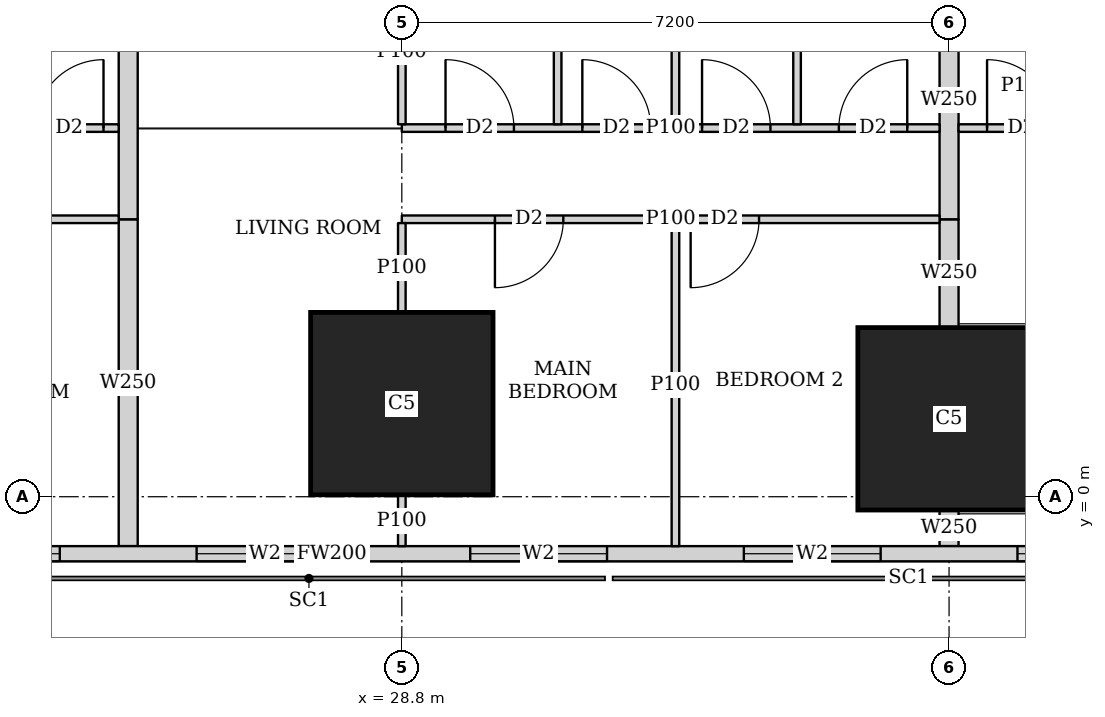
"""IFC4 building model, lengths in metres.
Left out: names, types, materials, properties, quantities, classifications, styles, units other than length and angle.
Written with IfcOpenShell. Run it as: python <this file> out.ifc"""

import sys

from ifc_helpers import new_model, si_unit, direction, frame, frame_2d, origin, origin_2d, place, context, subcontext, project, spatial, rectangle, extrude, element, fill, save


model = new_model("IFC4")
c1 = context("Model", 3, precision=1e-05, world=origin(), true_north=direction((0.0, 1.0)))
c2 = subcontext(c1, "Body", "Model", "MODEL_VIEW")
j1 = project(units=[si_unit("LENGTHUNIT", "METRE"), si_unit("PLANEANGLEUNIT", "RADIAN")], contexts=[c1])
p1 = place(None, origin())
s1 = spatial("IfcSite", under=j1, at=p1, CompositionType="ELEMENT")
p2 = place(p1, origin())
s2 = spatial("IfcBuilding", under=s1, at=p2, CompositionType="ELEMENT")
p3 = place(p2, frame((0.0, 0.0, 208.7)))
s3 = spatial("IfcBuildingStorey", under=s2, at=p3, CompositionType="ELEMENT", Elevation=208.7)
for number, where, z_axis, x_axis in (
    (1, (28.8, 1.225, 0.0), (0.0, 0.0, 1.0), (1.0, 0.0, 0.0)),
    (2, (36.0, 1.025, 0.0), (0.0, 0.0, 1.0), (1.0, 0.0, 0.0)),
):
    element("IfcColumn", number, at=place(p3, frame(where, z_axis=z_axis, x_axis=x_axis)), inside=s3, PredefinedType="COLUMN", context=c2, shape_type="SweptSolid", body=[
        extrude(rectangle(XDim=2.4, YDim=2.4, at=origin_2d()), origin(), (0.0, 0.0, 1.0), 3.75),
    ])
p4 = place(p3, frame((7.363, -0.75, 0.0), z_axis=(0.0, 0.0, 1.0), x_axis=(1.0, 0.0, 0.0)))
e3 = element("IfcWall", 3, at=p4, inside=s3, PredefinedType="SOLIDWALL", context=c2, shape_type="SweptSolid", body=[
    extrude(rectangle(XDim=40.428, YDim=0.2, at=frame_2d((20.214, 0.0))), origin(), (0.0, 0.0, 1.0), 3.5),
])
p5 = place(p4, frame((2.319, 0.0, 0.9)))
e4 = element("IfcOpeningElement", 4, at=p5, cuts=e3, PredefinedType="OPENING", context=c2, shape_type="SweptSolid", body=[
    extrude(rectangle(XDim=2.4, YDim=1.5, at=frame_2d((1.2, 0.75))), frame((0.0, 0.11, 0.0), z_axis=(0.0, -1.0, 0.0), x_axis=(1.0, 0.0, 0.0)), (0.0, 0.0, 1.0), 0.22),
])
p6 = place(p4, frame((7.937, 0.0, 0.9)))
e5 = element("IfcOpeningElement", 5, at=p6, cuts=e3, PredefinedType="OPENING", context=c2, shape_type="SweptSolid", body=[
    extrude(rectangle(XDim=1.8, YDim=1.5, at=frame_2d((0.9, 0.75))), frame((0.0, 0.11, 0.0), z_axis=(0.0, -1.0, 0.0), x_axis=(1.0, 0.0, 0.0)), (0.0, 0.0, 1.0), 0.22),
])
p7 = place(p4, frame((11.537, 0.0, 0.9)))
e6 = element("IfcOpeningElement", 6, at=p7, cuts=e3, PredefinedType="OPENING", context=c2, shape_type="SweptSolid", body=[
    extrude(rectangle(XDim=1.8, YDim=1.5, at=frame_2d((0.9, 0.75))), frame((0.0, 0.11, 0.0), z_axis=(0.0, -1.0, 0.0), x_axis=(1.0, 0.0, 0.0)), (0.0, 0.0, 1.0), 0.22),
])
p8 = place(p4, frame((15.137, 0.0, 0.9)))
e7 = element("IfcOpeningElement", 7, at=p8, cuts=e3, PredefinedType="OPENING", context=c2, shape_type="SweptSolid", body=[
    extrude(rectangle(XDim=1.8, YDim=1.5, at=frame_2d((0.9, 0.75))), frame((0.0, 0.11, 0.0), z_axis=(0.0, -1.0, 0.0), x_axis=(1.0, 0.0, 0.0)), (0.0, 0.0, 1.0), 0.22),
])
p9 = place(p4, frame((18.737, 0.0, 0.9)))
e8 = element("IfcOpeningElement", 8, at=p9, cuts=e3, PredefinedType="OPENING", context=c2, shape_type="SweptSolid", body=[
    extrude(rectangle(XDim=1.8, YDim=1.5, at=frame_2d((0.9, 0.75))), frame((0.0, 0.11, 0.0), z_axis=(0.0, -1.0, 0.0), x_axis=(1.0, 0.0, 0.0)), (0.0, 0.0, 1.0), 0.22),
])
p10 = place(p4, frame((22.337, 0.0, 0.9)))
e9 = element("IfcOpeningElement", 9, at=p10, cuts=e3, PredefinedType="OPENING", context=c2, shape_type="SweptSolid", body=[
    extrude(rectangle(XDim=1.8, YDim=1.5, at=frame_2d((0.9, 0.75))), frame((0.0, 0.11, 0.0), z_axis=(0.0, -1.0, 0.0), x_axis=(1.0, 0.0, 0.0)), (0.0, 0.0, 1.0), 0.22),
])
p11 = place(p4, frame((25.937, 0.0, 0.9)))
e10 = element("IfcOpeningElement", 10, at=p11, cuts=e3, PredefinedType="OPENING", context=c2, shape_type="SweptSolid", body=[
    extrude(rectangle(XDim=1.8, YDim=1.5, at=frame_2d((0.9, 0.75))), frame((0.0, 0.11, 0.0), z_axis=(0.0, -1.0, 0.0), x_axis=(1.0, 0.0, 0.0)), (0.0, 0.0, 1.0), 0.22),
])
p12 = place(p4, frame((29.537, 0.0, 0.9)))
e11 = element("IfcOpeningElement", 11, at=p12, cuts=e3, PredefinedType="OPENING", context=c2, shape_type="SweptSolid", body=[
    extrude(rectangle(XDim=1.8, YDim=1.5, at=frame_2d((0.9, 0.75))), frame((0.0, 0.11, 0.0), z_axis=(0.0, -1.0, 0.0), x_axis=(1.0, 0.0, 0.0)), (0.0, 0.0, 1.0), 0.22),
])
p13 = place(p3, frame((33.68, 42.723, 0.0), z_axis=(0.0, 0.0, 1.0), x_axis=(0.185601160014, -0.982625162207, 0.0)))
e12 = element("IfcWall", 12, at=p13, inside=s3, PredefinedType="SOLIDWALL", context=c2, shape_type="SweptSolid", body=[
    extrude(rectangle(XDim=41.051, YDim=0.15, at=frame_2d((20.526, 0.0))), origin(), (0.0, 0.0, 1.0), 2.5),
])
p14 = place(p13, frame((12.307, 0.0, 0.0)))
e13 = element("IfcOpeningElement", 13, at=p14, cuts=e12, PredefinedType="OPENING", context=c2, shape_type="SweptSolid", body=[
    extrude(rectangle(XDim=1.0, YDim=2.1, at=frame_2d((0.5, 1.05))), frame((0.0, 0.085, 0.0), z_axis=(0.0, -1.0, 0.0), x_axis=(1.0, 0.0, 0.0)), (0.0, 0.0, 1.0), 0.17),
])
p15 = place(p13, frame((16.123, 0.0, 0.0)))
e14 = element("IfcOpeningElement", 14, at=p15, cuts=e12, PredefinedType="OPENING", context=c2, shape_type="SweptSolid", body=[
    extrude(rectangle(XDim=1.0, YDim=2.1, at=frame_2d((0.5, 1.05))), frame((0.0, 0.085, 0.0), z_axis=(0.0, -1.0, 0.0), x_axis=(1.0, 0.0, 0.0)), (0.0, 0.0, 1.0), 0.17),
])
p16 = place(p13, frame((30.902, 0.0, 0.0)))
e15 = element("IfcOpeningElement", 15, at=p16, cuts=e12, PredefinedType="OPENING", context=c2, shape_type="SweptSolid", body=[
    extrude(rectangle(XDim=1.0, YDim=2.1, at=frame_2d((0.5, 1.05))), frame((0.0, 0.085, 0.0), z_axis=(0.0, -1.0, 0.0), x_axis=(1.0, 0.0, 0.0)), (0.0, 0.0, 1.0), 0.17),
])
p17 = place(p3, frame((25.075, 3.65, 0.0), z_axis=(0.0, 0.0, 1.0), x_axis=(-1.0, 0.0, 0.0)))
e16 = element("IfcWall", 16, at=p17, inside=s3, PredefinedType="PARTITIONING", context=c2, shape_type="SweptSolid", body=[
    extrude(rectangle(XDim=3.475, YDim=0.1, at=frame_2d((1.737, 0.0))), origin(), (0.0, 0.0, 1.0), 3.5),
])
p18 = place(p17, frame((2.375, 0.0, 0.0)))
e17 = element("IfcOpeningElement", 17, at=p18, cuts=e16, PredefinedType="OPENING", context=c2, shape_type="SweptSolid", body=[
    extrude(rectangle(XDim=0.9, YDim=2.1, at=frame_2d((0.45, 1.05))), frame((0.0, 0.06, 0.0), z_axis=(0.0, -1.0, 0.0), x_axis=(1.0, 0.0, 0.0)), (0.0, 0.0, 1.0), 0.12),
])
p19 = place(p3, frame((25.075, 4.85, 0.0), z_axis=(0.0, 0.0, 1.0), x_axis=(-1.0, 0.0, 0.0)))
e18 = element("IfcWall", 18, at=p19, inside=s3, PredefinedType="PARTITIONING", context=c2, shape_type="SweptSolid", body=[
    extrude(rectangle(XDim=3.475, YDim=0.1, at=frame_2d((1.737, 0.0))), origin(), (0.0, 0.0, 1.0), 3.5),
])
p20 = place(p19, frame((2.0, 0.0, 0.0)))
e19 = element("IfcOpeningElement", 19, at=p20, cuts=e18, PredefinedType="OPENING", context=c2, shape_type="SweptSolid", body=[
    extrude(rectangle(XDim=0.9, YDim=2.1, at=frame_2d((0.45, 1.05))), frame((0.0, 0.06, 0.0), z_axis=(0.0, -1.0, 0.0), x_axis=(1.0, 0.0, 0.0)), (0.0, 0.0, 1.0), 0.12),
])
p21 = place(p19, frame((0.2, 0.0, 0.0)))
e20 = element("IfcOpeningElement", 20, at=p21, cuts=e18, PredefinedType="OPENING", context=c2, shape_type="SweptSolid", body=[
    extrude(rectangle(XDim=0.9, YDim=2.1, at=frame_2d((0.45, 1.05))), frame((0.0, 0.06, 0.0), z_axis=(0.0, -1.0, 0.0), x_axis=(1.0, 0.0, 0.0)), (0.0, 0.0, 1.0), 0.12),
])
p22 = place(p3, frame((35.875, 3.65, 0.0), z_axis=(0.0, 0.0, 1.0), x_axis=(-1.0, 0.0, 0.0)))
e21 = element("IfcWall", 21, at=p22, inside=s3, PredefinedType="PARTITIONING", context=c2, shape_type="SweptSolid", body=[
    extrude(rectangle(XDim=7.075, YDim=0.1, at=frame_2d((3.538, 0.0))), origin(), (0.0, 0.0, 1.0), 3.5),
])
p23 = place(p22, frame((4.95, 0.0, 0.0)))
e22 = element("IfcOpeningElement", 22, at=p23, cuts=e21, PredefinedType="OPENING", context=c2, shape_type="SweptSolid", body=[
    extrude(rectangle(XDim=0.9, YDim=2.1, at=frame_2d((0.45, 1.05))), frame((0.0, 0.06, 0.0), z_axis=(0.0, -1.0, 0.0), x_axis=(1.0, 0.0, 0.0)), (0.0, 0.0, 1.0), 0.12),
])
p24 = place(p22, frame((2.375, 0.0, 0.0)))
e23 = element("IfcOpeningElement", 23, at=p24, cuts=e21, PredefinedType="OPENING", context=c2, shape_type="SweptSolid", body=[
    extrude(rectangle(XDim=0.9, YDim=2.1, at=frame_2d((0.45, 1.05))), frame((0.0, 0.06, 0.0), z_axis=(0.0, -1.0, 0.0), x_axis=(1.0, 0.0, 0.0)), (0.0, 0.0, 1.0), 0.12),
])
p25 = place(p3, frame((35.875, 4.85, 0.0), z_axis=(0.0, 0.0, 1.0), x_axis=(-1.0, 0.0, 0.0)))
e24 = element("IfcWall", 24, at=p25, inside=s3, PredefinedType="PARTITIONING", context=c2, shape_type="SweptSolid", body=[
    extrude(rectangle(XDim=7.075, YDim=0.1, at=frame_2d((3.538, 0.0))), origin(), (0.0, 0.0, 1.0), 3.5),
])
p26 = place(p25, frame((5.6, 0.0, 0.0)))
e25 = element("IfcOpeningElement", 25, at=p26, cuts=e24, PredefinedType="OPENING", context=c2, shape_type="SweptSolid", body=[
    extrude(rectangle(XDim=0.9, YDim=2.1, at=frame_2d((0.45, 1.05))), frame((0.0, 0.06, 0.0), z_axis=(0.0, -1.0, 0.0), x_axis=(1.0, 0.0, 0.0)), (0.0, 0.0, 1.0), 0.12),
])
p27 = place(p25, frame((2.225, 0.0, 0.0)))
e26 = element("IfcOpeningElement", 26, at=p27, cuts=e24, PredefinedType="OPENING", context=c2, shape_type="SweptSolid", body=[
    extrude(rectangle(XDim=0.9, YDim=2.1, at=frame_2d((0.45, 1.05))), frame((0.0, 0.06, 0.0), z_axis=(0.0, -1.0, 0.0), x_axis=(1.0, 0.0, 0.0)), (0.0, 0.0, 1.0), 0.12),
])
p28 = place(p25, frame((3.8, 0.0, 0.0)))
e27 = element("IfcOpeningElement", 27, at=p28, cuts=e24, PredefinedType="OPENING", context=c2, shape_type="SweptSolid", body=[
    extrude(rectangle(XDim=0.9, YDim=2.1, at=frame_2d((0.45, 1.05))), frame((0.0, 0.06, 0.0), z_axis=(0.0, -1.0, 0.0), x_axis=(1.0, 0.0, 0.0)), (0.0, 0.0, 1.0), 0.12),
])
p29 = place(p25, frame((0.425, 0.0, 0.0)))
e28 = element("IfcOpeningElement", 28, at=p29, cuts=e24, PredefinedType="OPENING", context=c2, shape_type="SweptSolid", body=[
    extrude(rectangle(XDim=0.9, YDim=2.1, at=frame_2d((0.45, 1.05))), frame((0.0, 0.06, 0.0), z_axis=(0.0, -1.0, 0.0), x_axis=(1.0, 0.0, 0.0)), (0.0, 0.0, 1.0), 0.12),
])
p30 = place(p3, frame((28.8, -0.65, 0.0), z_axis=(0.0, 0.0, 1.0), x_axis=(0.0, 1.0, 0.0)))
e29 = element("IfcWall", 29, at=p30, inside=s3, PredefinedType="PARTITIONING", context=c2, shape_type="SweptSolid", body=[
    extrude(rectangle(XDim=0.674, YDim=0.1, at=frame_2d((0.337, 0.0))), origin(), (0.0, 0.0, 1.0), 3.5),
])
p31 = place(p3, frame((28.8, 2.426, 0.0), z_axis=(0.0, 0.0, 1.0), x_axis=(0.0, 1.0, 0.0)))
e30 = element("IfcWall", 30, at=p31, inside=s3, PredefinedType="PARTITIONING", context=c2, shape_type="SweptSolid", body=[
    extrude(rectangle(XDim=1.174, YDim=0.1, at=frame_2d((0.587, 0.0))), origin(), (0.0, 0.0, 1.0), 3.5),
])
p32 = place(p3, frame((32.4, -0.65, 0.0), z_axis=(0.0, 0.0, 1.0), x_axis=(0.0, 1.0, 0.0)))
e31 = element("IfcWall", 31, at=p32, inside=s3, PredefinedType="PARTITIONING", context=c2, shape_type="SweptSolid", body=[
    extrude(rectangle(XDim=4.25, YDim=0.1, at=frame_2d((2.125, 0.0))), origin(), (0.0, 0.0, 1.0), 2.05),
])
p33 = place(p3, frame((28.8, 4.9, 0.0), z_axis=(0.0, 0.0, 1.0), x_axis=(0.0, 1.0, 0.0)))
e32 = element("IfcWall", 32, at=p33, inside=s3, PredefinedType="PARTITIONING", context=c2, shape_type="SweptSolid", body=[
    extrude(rectangle(XDim=1.899, YDim=0.1, at=frame_2d((0.95, 0.0))), origin(), (0.0, 0.0, 1.0), 3.5),
])
for number, where, z_axis, x_axis in (
    (33, (32.4, 4.9, 0.0), (0.0, 0.0, 1.0), (0.0, 1.0, 0.0)),
    (34, (30.85, 4.9, 0.0), (0.0, 0.0, 1.0), (0.0, 1.0, 0.0)),
    (35, (34.0, 4.9, 0.0), (0.0, 0.0, 1.0), (0.0, 1.0, 0.0)),
):
    element("IfcWall", number, at=place(p3, frame(where, z_axis=z_axis, x_axis=x_axis)), inside=s3, PredefinedType="PARTITIONING", context=c2, shape_type="SweptSolid", body=[
        extrude(rectangle(XDim=3.525, YDim=0.1, at=frame_2d((1.763, 0.0))), origin(), (0.0, 0.0, 1.0), 3.5),
    ])
p34 = place(p3, frame((25.2, -0.65, 0.0), z_axis=(0.0, 0.0, 1.0), x_axis=(0.0, 1.0, 0.0)))
e36 = element("IfcWall", 36, at=p34, inside=s3, PredefinedType="SOLIDWALL", context=c2, shape_type="SweptSolid", body=[
    extrude(rectangle(XDim=4.3, YDim=0.25, at=frame_2d((2.15, 0.0))), origin(), (0.0, 0.0, 1.0), 2.05),
])
p35 = place(p3, frame((25.2, 3.65, 0.0), z_axis=(0.0, 0.0, 1.0), x_axis=(0.0, 1.0, 0.0)))
e37 = element("IfcWall", 37, at=p35, inside=s3, PredefinedType="SOLIDWALL", context=c2, shape_type="SweptSolid", body=[
    extrude(rectangle(XDim=4.775, YDim=0.25, at=frame_2d((2.388, 0.0))), origin(), (0.0, 0.0, 1.0), 3.5),
])
p36 = place(p3, frame((37.89, 4.85, 0.0), z_axis=(0.0, 0.0, 1.0), x_axis=(-1.0, 0.0, 0.0)))
e38 = element("IfcWall", 38, at=p36, inside=s3, PredefinedType="PARTITIONING", context=c2, shape_type="SweptSolid", body=[
    extrude(rectangle(XDim=1.765, YDim=0.1, at=frame_2d((0.882, 0.0))), origin(), (0.0, 0.0, 1.0), 3.5),
])
p37 = place(p36, frame((0.49, 0.0, 0.0)))
e39 = element("IfcOpeningElement", 39, at=p37, cuts=e38, PredefinedType="OPENING", context=c2, shape_type="SweptSolid", body=[
    extrude(rectangle(XDim=0.9, YDim=2.1, at=frame_2d((0.45, 1.05))), frame((0.0, 0.06, 0.0), z_axis=(0.0, -1.0, 0.0), x_axis=(1.0, 0.0, 0.0)), (0.0, 0.0, 1.0), 0.12),
])
p38 = place(p3, frame((36.0, -0.65, 0.0), z_axis=(0.0, 0.0, 1.0), x_axis=(0.0, 1.0, 0.0)))
e40 = element("IfcWall", 40, at=p38, inside=s3, PredefinedType="SOLIDWALL", context=c2, shape_type="SweptSolid", body=[
    extrude(rectangle(XDim=0.474, YDim=0.25, at=frame_2d((0.237, 0.0))), origin(), (0.0, 0.0, 1.0), 2.05),
])
p39 = place(p3, frame((36.0, 2.226, 0.0), z_axis=(0.0, 0.0, 1.0), x_axis=(0.0, 1.0, 0.0)))
e41 = element("IfcWall", 41, at=p39, inside=s3, PredefinedType="SOLIDWALL", context=c2, shape_type="SweptSolid", body=[
    extrude(rectangle(XDim=1.424, YDim=0.25, at=frame_2d((0.712, 0.0))), origin(), (0.0, 0.0, 1.0), 2.05),
])
p40 = place(p3, frame((36.0, 3.65, 0.0), z_axis=(0.0, 0.0, 1.0), x_axis=(0.0, 1.0, 0.0)))
e42 = element("IfcWall", 42, at=p40, inside=s3, PredefinedType="SOLIDWALL", context=c2, shape_type="SweptSolid", body=[
    extrude(rectangle(XDim=3.149, YDim=0.25, at=frame_2d((1.575, 0.0))), origin(), (0.0, 0.0, 1.0), 3.5),
])
p41 = place(p8, origin())
e43 = element("IfcWindow", 43, at=p41, inside=s3, PartitioningType="SINGLE_PANEL", PredefinedType="WINDOW", context=c2, shape_type="SweptSolid", body=[
    extrude(rectangle(XDim=1.8, YDim=1.5, at=frame_2d((0.9, 0.75))), frame((0.0, 0.03, 0.0), z_axis=(0.0, -1.0, 0.0), x_axis=(1.0, 0.0, 0.0)), (0.0, 0.0, 1.0), 0.06),
])
fill(e7, e43)
p42 = place(p9, origin())
e44 = element("IfcWindow", 44, at=p42, inside=s3, PartitioningType="SINGLE_PANEL", PredefinedType="WINDOW", context=c2, shape_type="SweptSolid", body=[
    extrude(rectangle(XDim=1.8, YDim=1.5, at=frame_2d((0.9, 0.75))), frame((0.0, 0.03, 0.0), z_axis=(0.0, -1.0, 0.0), x_axis=(1.0, 0.0, 0.0)), (0.0, 0.0, 1.0), 0.06),
])
fill(e8, e44)
p43 = place(p10, origin())
e45 = element("IfcWindow", 45, at=p43, inside=s3, PartitioningType="SINGLE_PANEL", PredefinedType="WINDOW", context=c2, shape_type="SweptSolid", body=[
    extrude(rectangle(XDim=1.8, YDim=1.5, at=frame_2d((0.9, 0.75))), frame((0.0, 0.03, 0.0), z_axis=(0.0, -1.0, 0.0), x_axis=(1.0, 0.0, 0.0)), (0.0, 0.0, 1.0), 0.06),
])
fill(e9, e45)
p44 = place(p11, origin())
e46 = element("IfcWindow", 46, at=p44, inside=s3, PartitioningType="SINGLE_PANEL", PredefinedType="WINDOW", context=c2, shape_type="SweptSolid", body=[
    extrude(rectangle(XDim=1.8, YDim=1.5, at=frame_2d((0.9, 0.75))), frame((0.0, 0.03, 0.0), z_axis=(0.0, -1.0, 0.0), x_axis=(1.0, 0.0, 0.0)), (0.0, 0.0, 1.0), 0.06),
])
fill(e10, e46)
p45 = place(p12, origin())
e47 = element("IfcWindow", 47, at=p45, inside=s3, PartitioningType="SINGLE_PANEL", PredefinedType="WINDOW", context=c2, shape_type="SweptSolid", body=[
    extrude(rectangle(XDim=1.8, YDim=1.5, at=frame_2d((0.9, 0.75))), frame((0.0, 0.03, 0.0), z_axis=(0.0, -1.0, 0.0), x_axis=(1.0, 0.0, 0.0)), (0.0, 0.0, 1.0), 0.06),
])
fill(e11, e47)
p46 = place(p21, origin())
e48 = element("IfcDoor", 48, at=p46, inside=s3, OperationType="SINGLE_SWING_RIGHT", PredefinedType="DOOR", context=c2, shape_type="SweptSolid", body=[
    extrude(rectangle(XDim=0.9, YDim=2.1, at=frame_2d((0.45, 1.05))), frame((0.0, 0.025, 0.0), z_axis=(0.0, -1.0, 0.0), x_axis=(1.0, 0.0, 0.0)), (0.0, 0.0, 1.0), 0.05),
])
fill(e20, e48)
p47 = place(p23, origin())
e49 = element("IfcDoor", 49, at=p47, inside=s3, OperationType="SINGLE_SWING_RIGHT", PredefinedType="DOOR", context=c2, shape_type="SweptSolid", body=[
    extrude(rectangle(XDim=0.9, YDim=2.1, at=frame_2d((0.45, 1.05))), frame((0.0, 0.025, 0.0), z_axis=(0.0, -1.0, 0.0), x_axis=(1.0, 0.0, 0.0)), (0.0, 0.0, 1.0), 0.05),
])
fill(e22, e49)
p48 = place(p24, origin())
e50 = element("IfcDoor", 50, at=p48, inside=s3, OperationType="SINGLE_SWING_RIGHT", PredefinedType="DOOR", context=c2, shape_type="SweptSolid", body=[
    extrude(rectangle(XDim=0.9, YDim=2.1, at=frame_2d((0.45, 1.05))), frame((0.0, 0.025, 0.0), z_axis=(0.0, -1.0, 0.0), x_axis=(1.0, 0.0, 0.0)), (0.0, 0.0, 1.0), 0.05),
])
fill(e23, e50)
p49 = place(p26, origin())
e51 = element("IfcDoor", 51, at=p49, inside=s3, OperationType="SINGLE_SWING_LEFT", PredefinedType="DOOR", context=c2, shape_type="SweptSolid", body=[
    extrude(rectangle(XDim=0.9, YDim=2.1, at=frame_2d((0.45, 1.05))), frame((0.0, 0.025, 0.0), z_axis=(0.0, -1.0, 0.0), x_axis=(1.0, 0.0, 0.0)), (0.0, 0.0, 1.0), 0.05),
])
fill(e25, e51)
p50 = place(p27, origin())
e52 = element("IfcDoor", 52, at=p50, inside=s3, OperationType="SINGLE_SWING_LEFT", PredefinedType="DOOR", context=c2, shape_type="SweptSolid", body=[
    extrude(rectangle(XDim=0.9, YDim=2.1, at=frame_2d((0.45, 1.05))), frame((0.0, 0.025, 0.0), z_axis=(0.0, -1.0, 0.0), x_axis=(1.0, 0.0, 0.0)), (0.0, 0.0, 1.0), 0.05),
])
fill(e26, e52)
p51 = place(p28, origin())
e53 = element("IfcDoor", 53, at=p51, inside=s3, OperationType="SINGLE_SWING_LEFT", PredefinedType="DOOR", context=c2, shape_type="SweptSolid", body=[
    extrude(rectangle(XDim=0.9, YDim=2.1, at=frame_2d((0.45, 1.05))), frame((0.0, 0.025, 0.0), z_axis=(0.0, -1.0, 0.0), x_axis=(1.0, 0.0, 0.0)), (0.0, 0.0, 1.0), 0.05),
])
fill(e27, e53)
p52 = place(p29, origin())
e54 = element("IfcDoor", 54, at=p52, inside=s3, OperationType="SINGLE_SWING_RIGHT", PredefinedType="DOOR", context=c2, shape_type="SweptSolid", body=[
    extrude(rectangle(XDim=0.9, YDim=2.1, at=frame_2d((0.45, 1.05))), frame((0.0, 0.025, 0.0), z_axis=(0.0, -1.0, 0.0), x_axis=(1.0, 0.0, 0.0)), (0.0, 0.0, 1.0), 0.05),
])
fill(e28, e54)
p53 = place(p37, origin())
e55 = element("IfcDoor", 55, at=p53, inside=s3, OperationType="SINGLE_SWING_LEFT", PredefinedType="DOOR", context=c2, shape_type="SweptSolid", body=[
    extrude(rectangle(XDim=0.9, YDim=2.1, at=frame_2d((0.45, 1.05))), frame((0.0, 0.025, 0.0), z_axis=(0.0, -1.0, 0.0), x_axis=(1.0, 0.0, 0.0)), (0.0, 0.0, 1.0), 0.05),
])
fill(e39, e55)
save(model, sys.argv[1])
